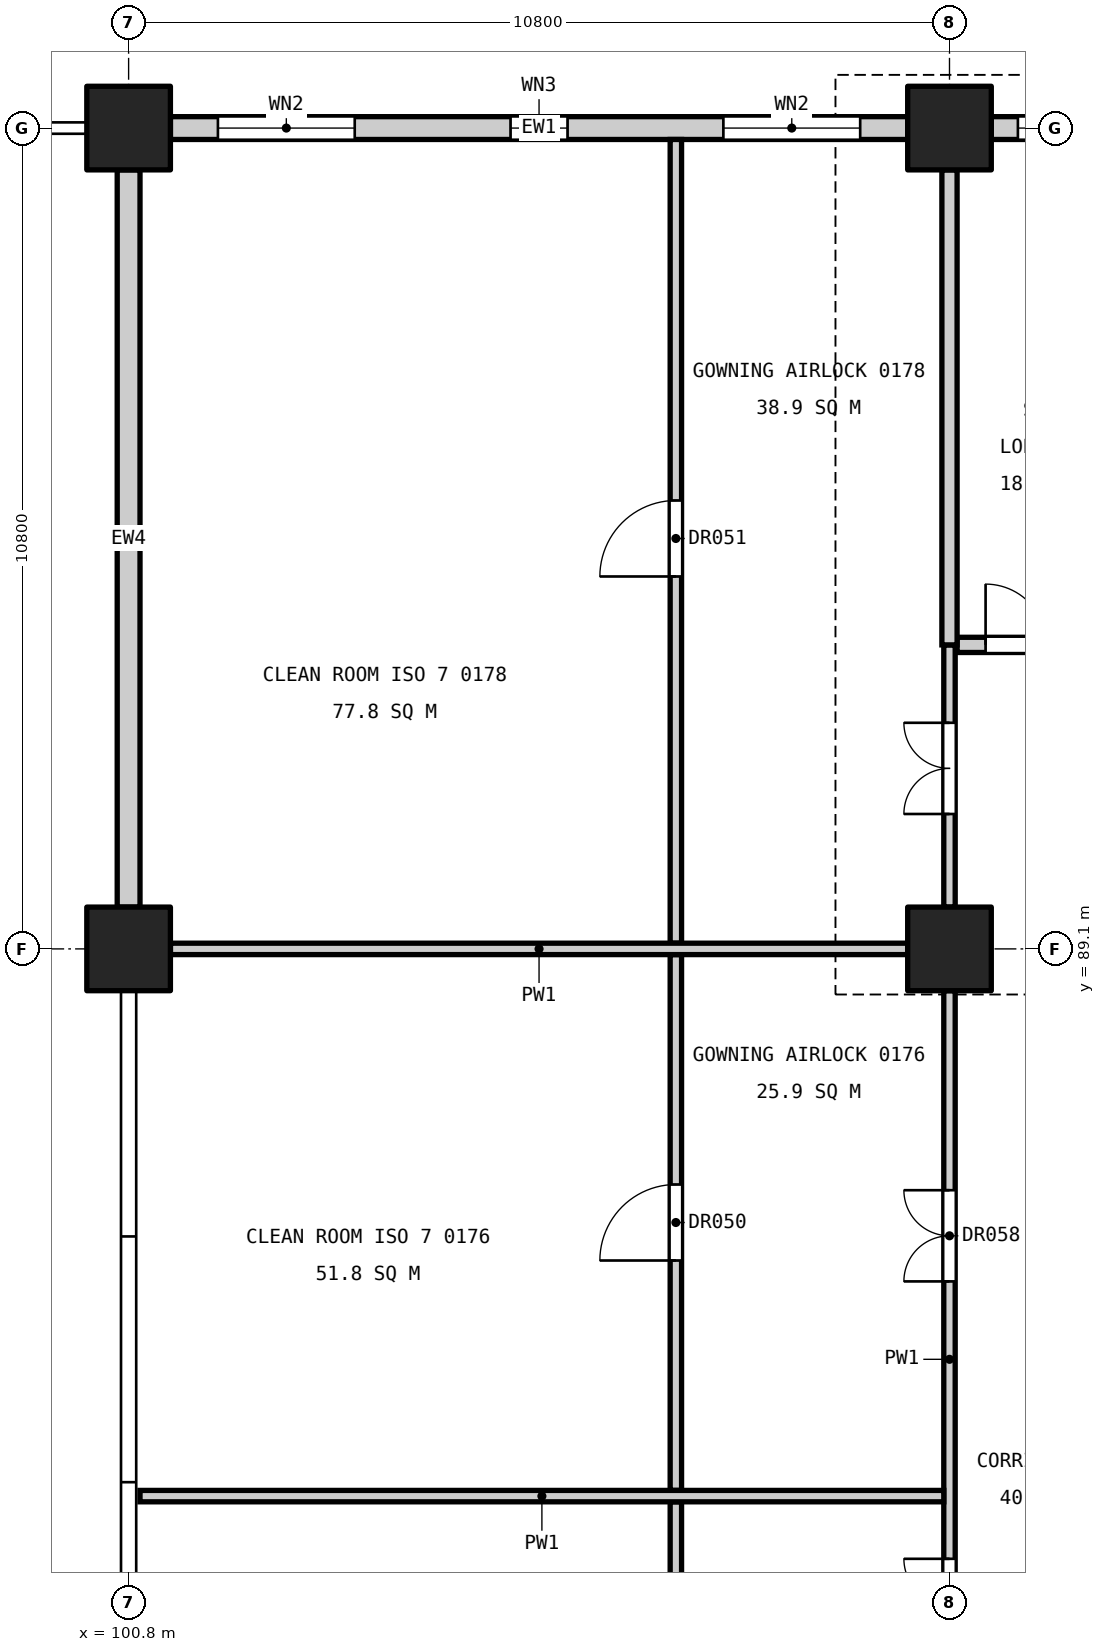
"""IFC4 building model, lengths in metres.
Left out: names, types, materials, properties, quantities, classifications, styles, units other than length and angle.
Written with IfcOpenShell. Run it as: python <this file> out.ifc"""

import sys

from ifc_helpers import new_model, si_unit, direction, frame, frame_2d, origin, origin_2d, place, context, subcontext, project, spatial, rectangle, extrude, element, fill, save


model = new_model("IFC4")
c1 = context("Model", 3, precision=1e-05, world=origin(), true_north=direction((0.0, 1.0)))
c2 = subcontext(c1, "Body", "Model", "MODEL_VIEW")
j1 = project(units=[si_unit("LENGTHUNIT", "METRE"), si_unit("PLANEANGLEUNIT", "RADIAN")], contexts=[c1])
p1 = place(None, origin())
s1 = spatial("IfcSite", under=j1, at=p1, CompositionType="ELEMENT")
p2 = place(p1, origin())
s2 = spatial("IfcBuilding", under=s1, at=p2, CompositionType="ELEMENT")
p3 = place(p2, frame((0.0, 0.0, 6.0)))
s3 = spatial("IfcBuildingStorey", under=s2, at=p3, CompositionType="ELEMENT", Elevation=6.0)
for number, where, z_axis, x_axis in (
    (1, (111.6, 89.1, 0.0), (0.0, 0.0, 1.0), (1.0, 0.0, 0.0)),
    (2, (111.6, 99.9, 0.0), (0.0, 0.0, 1.0), (1.0, 0.0, 0.0)),
    (3, (100.8, 89.1, 0.0), (0.0, 0.0, 1.0), (1.0, 0.0, 0.0)),
    (4, (100.8, 99.9, 0.0), (0.0, 0.0, 1.0), (1.0, 0.0, 0.0)),
):
    element("IfcColumn", number, at=place(p3, frame(where, z_axis=z_axis, x_axis=x_axis)), inside=s3, PredefinedType="COLUMN", context=c2, shape_type="SweptSolid", body=[
        extrude(rectangle(XDim=1.1, YDim=1.1, at=origin_2d()), origin(), (0.0, 0.0, 1.0), 5.4),
    ])
p4 = place(p3, frame((114.05, 99.9, 0.0), z_axis=(0.0, 0.0, 1.0), x_axis=(-1.0, 0.0, 0.0)))
e5 = element("IfcWall", 5, at=p4, inside=s3, PredefinedType="STANDARD", context=c2, shape_type="SweptSolid", body=[
    extrude(rectangle(XDim=1.9, YDim=0.3, at=frame_2d((0.95, 0.0))), origin(), (0.0, 0.0, 1.0), 4.3),
])
p5 = place(p4, frame((0.35, 0.0, 0.9)))
e6 = element("IfcOpeningElement", 6, at=p5, cuts=e5, PredefinedType="OPENING", context=c2, shape_type="SweptSolid", body=[
    extrude(rectangle(XDim=1.2, YDim=2.4, at=frame_2d((0.6, 1.2))), frame((0.0, 0.16, 0.0), z_axis=(0.0, -1.0, 0.0), x_axis=(1.0, 0.0, 0.0)), (0.0, 0.0, 1.0), 0.32),
])
p6 = place(p3, frame((111.05, 99.9, 0.0), z_axis=(0.0, 0.0, 1.0), x_axis=(-1.0, 0.0, 0.0)))
e7 = element("IfcWall", 7, at=p6, inside=s3, PredefinedType="STANDARD", context=c2, shape_type="SweptSolid", body=[
    extrude(rectangle(XDim=9.7, YDim=0.3, at=frame_2d((4.85, 0.0))), origin(), (0.0, 0.0, 1.0), 4.3),
])
p7 = place(p6, frame((0.625, 0.0, 0.9)))
e8 = element("IfcOpeningElement", 8, at=p7, cuts=e7, PredefinedType="OPENING", context=c2, shape_type="SweptSolid", body=[
    extrude(rectangle(XDim=1.8, YDim=3.0, at=frame_2d((0.9, 1.5))), frame((0.0, 0.16, 0.0), z_axis=(0.0, -1.0, 0.0), x_axis=(1.0, 0.0, 0.0)), (0.0, 0.0, 1.0), 0.32),
])
p8 = place(p6, frame((4.475, 0.0, 0.8)))
e9 = element("IfcOpeningElement", 9, at=p8, cuts=e7, PredefinedType="OPENING", context=c2, shape_type="SweptSolid", body=[
    extrude(rectangle(XDim=0.75, YDim=1.2, at=frame_2d((0.375, 0.6))), frame((0.0, 0.16, 0.0), z_axis=(0.0, -1.0, 0.0), x_axis=(1.0, 0.0, 0.0)), (0.0, 0.0, 1.0), 0.32),
])
p9 = place(p6, frame((7.275, 0.0, 0.9)))
e10 = element("IfcOpeningElement", 10, at=p9, cuts=e7, PredefinedType="OPENING", context=c2, shape_type="SweptSolid", body=[
    extrude(rectangle(XDim=1.8, YDim=3.0, at=frame_2d((0.9, 1.5))), frame((0.0, 0.16, 0.0), z_axis=(0.0, -1.0, 0.0), x_axis=(1.0, 0.0, 0.0)), (0.0, 0.0, 1.0), 0.32),
])
p10 = place(p3, frame((100.8, 89.65, 0.0), z_axis=(0.0, 0.0, 1.0), x_axis=(0.0, 1.0, 0.0)))
e11 = element("IfcWall", 11, at=p10, inside=s3, PredefinedType="STANDARD", context=c2, shape_type="SweptSolid", body=[
    extrude(rectangle(XDim=9.7, YDim=0.3, at=frame_2d((4.85, 0.0))), origin(), (0.0, 0.0, 1.0), 4.0),
])
p11 = place(p3, frame((114.05, 93.1, 0.0), z_axis=(0.0, 0.0, 1.0), x_axis=(-1.0, 0.0, 0.0)))
e12 = element("IfcWall", 12, at=p11, inside=s3, PredefinedType="PARTITIONING", context=c2, shape_type="SweptSolid", body=[
    extrude(rectangle(XDim=2.35, YDim=0.2, at=frame_2d((1.175, 0.0))), origin(), (0.0, 0.0, 1.0), 4.0),
])
p12 = place(p11, frame((0.375, 0.0, 0.0)))
e13 = element("IfcOpeningElement", 13, at=p12, cuts=e12, PredefinedType="OPENING", context=c2, shape_type="SweptSolid", body=[
    extrude(rectangle(XDim=1.6, YDim=2.1, at=frame_2d((0.8, 1.05))), frame((0.0, 0.11, 0.0), z_axis=(0.0, -1.0, 0.0), x_axis=(1.0, 0.0, 0.0)), (0.0, 0.0, 1.0), 0.22),
])
p13 = place(p3, frame((111.6, 78.85, 0.0), z_axis=(0.0, 0.0, 1.0), x_axis=(0.0, 1.0, 0.0)))
e14 = element("IfcWall", 14, at=p13, inside=s3, PredefinedType="PARTITIONING", context=c2, shape_type="SweptSolid", body=[
    extrude(rectangle(XDim=9.7, YDim=0.15, at=frame_2d((4.85, 0.0))), origin(), (0.0, 0.0, 1.0), 4.0),
])
p14 = place(p13, frame((1.025, 0.0, 0.0)))
e15 = element("IfcOpeningElement", 15, at=p14, cuts=e14, PredefinedType="OPENING", context=c2, shape_type="SweptSolid", body=[
    extrude(rectangle(XDim=1.2, YDim=2.1, at=frame_2d((0.6, 1.05))), frame((0.0, 0.085, 0.0), z_axis=(0.0, -1.0, 0.0), x_axis=(1.0, 0.0, 0.0)), (0.0, 0.0, 1.0), 0.17),
])
p15 = place(p13, frame((5.875, 0.0, 0.0)))
e16 = element("IfcOpeningElement", 16, at=p15, cuts=e14, PredefinedType="OPENING", context=c2, shape_type="SweptSolid", body=[
    extrude(rectangle(XDim=1.2, YDim=2.1, at=frame_2d((0.6, 1.05))), frame((0.0, 0.085, 0.0), z_axis=(0.0, -1.0, 0.0), x_axis=(1.0, 0.0, 0.0)), (0.0, 0.0, 1.0), 0.17),
])
p16 = place(p3, frame((111.6, 89.65, 0.0), z_axis=(0.0, 0.0, 1.0), x_axis=(0.0, 1.0, 0.0)))
e17 = element("IfcWall", 17, at=p16, inside=s3, PredefinedType="PARTITIONING", context=c2, shape_type="SweptSolid", body=[
    extrude(rectangle(XDim=3.45, YDim=0.15, at=frame_2d((1.725, 0.0))), origin(), (0.0, 0.0, 1.0), 4.0),
])
p17 = place(p16, frame((1.225, 0.0, 0.0)))
e18 = element("IfcOpeningElement", 18, at=p17, cuts=e17, PredefinedType="OPENING", context=c2, shape_type="SweptSolid", body=[
    extrude(rectangle(XDim=1.2, YDim=2.1, at=frame_2d((0.6, 1.05))), frame((0.0, 0.085, 0.0), z_axis=(0.0, -1.0, 0.0), x_axis=(1.0, 0.0, 0.0)), (0.0, 0.0, 1.0), 0.17),
])
p18 = place(p3, frame((111.6, 93.1, 0.0), z_axis=(0.0, 0.0, 1.0), x_axis=(0.0, 1.0, 0.0)))
e19 = element("IfcWall", 19, at=p18, inside=s3, PredefinedType="PARTITIONING", context=c2, shape_type="SweptSolid", body=[
    extrude(rectangle(XDim=6.25, YDim=0.2, at=frame_2d((3.125, 0.0))), origin(), (0.0, 0.0, 1.0), 4.0),
])
p19 = place(p3, frame((108.0, 78.45, 0.0), z_axis=(0.0, 0.0, 1.0), x_axis=(0.0, 1.0, 0.0)))
e20 = element("IfcWall", 20, at=p19, inside=s3, PredefinedType="PARTITIONING", context=c2, shape_type="SweptSolid", body=[
    extrude(rectangle(XDim=3.375, YDim=0.15, at=frame_2d((1.688, 0.0))), origin(), (0.0, 0.0, 1.0), 4.0),
])
p20 = place(p19, frame((1.15, 0.0, 0.0)))
e21 = element("IfcOpeningElement", 21, at=p20, cuts=e20, PredefinedType="OPENING", context=c2, shape_type="SweptSolid", body=[
    extrude(rectangle(XDim=1.0, YDim=2.1, at=frame_2d((0.5, 1.05))), frame((0.0, 0.085, 0.0), z_axis=(0.0, -1.0, 0.0), x_axis=(1.0, 0.0, 0.0)), (0.0, 0.0, 1.0), 0.17),
])
p21 = place(p3, frame((108.0, 81.975, 0.0), z_axis=(0.0, 0.0, 1.0), x_axis=(0.0, 1.0, 0.0)))
e22 = element("IfcWall", 22, at=p21, inside=s3, PredefinedType="PARTITIONING", context=c2, shape_type="SweptSolid", body=[
    extrude(rectangle(XDim=7.05, YDim=0.15, at=frame_2d((3.525, 0.0))), origin(), (0.0, 0.0, 1.0), 4.0),
])
p22 = place(p21, frame((3.025, 0.0, 0.0)))
e23 = element("IfcOpeningElement", 23, at=p22, cuts=e22, PredefinedType="OPENING", context=c2, shape_type="SweptSolid", body=[
    extrude(rectangle(XDim=1.0, YDim=2.1, at=frame_2d((0.5, 1.05))), frame((0.0, 0.085, 0.0), z_axis=(0.0, -1.0, 0.0), x_axis=(1.0, 0.0, 0.0)), (0.0, 0.0, 1.0), 0.17),
])
p23 = place(p3, frame((108.0, 89.175, 0.0), z_axis=(0.0, 0.0, 1.0), x_axis=(0.0, 1.0, 0.0)))
e24 = element("IfcWall", 24, at=p23, inside=s3, PredefinedType="PARTITIONING", context=c2, shape_type="SweptSolid", body=[
    extrude(rectangle(XDim=10.575, YDim=0.15, at=frame_2d((5.288, 0.0))), origin(), (0.0, 0.0, 1.0), 4.0),
])
p24 = place(p23, frame((4.825, 0.0, 0.0)))
e25 = element("IfcOpeningElement", 25, at=p24, cuts=e24, PredefinedType="OPENING", context=c2, shape_type="SweptSolid", body=[
    extrude(rectangle(XDim=1.0, YDim=2.1, at=frame_2d((0.5, 1.05))), frame((0.0, 0.085, 0.0), z_axis=(0.0, -1.0, 0.0), x_axis=(1.0, 0.0, 0.0)), (0.0, 0.0, 1.0), 0.17),
])
p25 = place(p3, frame((111.525, 81.9, 0.0), z_axis=(0.0, 0.0, 1.0), x_axis=(-1.0, 0.0, 0.0)))
e26 = element("IfcWall", 26, at=p25, inside=s3, PredefinedType="PARTITIONING", context=c2, shape_type="SweptSolid", body=[
    extrude(rectangle(XDim=10.575, YDim=0.15, at=frame_2d((5.288, 0.0))), origin(), (0.0, 0.0, 1.0), 4.3),
])
p26 = place(p3, frame((111.05, 89.1, 0.0), z_axis=(0.0, 0.0, 1.0), x_axis=(-1.0, 0.0, 0.0)))
e27 = element("IfcWall", 27, at=p26, inside=s3, PredefinedType="PARTITIONING", context=c2, shape_type="SweptSolid", body=[
    extrude(rectangle(XDim=9.7, YDim=0.15, at=frame_2d((4.85, 0.0))), origin(), (0.0, 0.0, 1.0), 4.3),
])
p27 = place(p5, origin())
e28 = element("IfcWindow", 28, at=p27, inside=s3, PartitioningType="SINGLE_PANEL", PredefinedType="WINDOW", context=c2, shape_type="SweptSolid", body=[
    extrude(rectangle(XDim=1.2, YDim=2.4, at=frame_2d((0.6, 1.2))), frame((0.0, 0.03, 0.0), z_axis=(0.0, -1.0, 0.0), x_axis=(1.0, 0.0, 0.0)), (0.0, 0.0, 1.0), 0.06),
])
fill(e6, e28)
p28 = place(p7, origin())
e29 = element("IfcWindow", 29, at=p28, inside=s3, PartitioningType="SINGLE_PANEL", PredefinedType="WINDOW", context=c2, shape_type="SweptSolid", body=[
    extrude(rectangle(XDim=1.8, YDim=3.0, at=frame_2d((0.9, 1.5))), frame((0.0, 0.03, 0.0), z_axis=(0.0, -1.0, 0.0), x_axis=(1.0, 0.0, 0.0)), (0.0, 0.0, 1.0), 0.06),
])
fill(e8, e29)
p29 = place(p8, origin())
e30 = element("IfcWindow", 30, at=p29, inside=s3, PartitioningType="SINGLE_PANEL", PredefinedType="WINDOW", context=c2, shape_type="SweptSolid", body=[
    extrude(rectangle(XDim=0.75, YDim=1.2, at=frame_2d((0.375, 0.6))), frame((0.0, 0.03, 0.0), z_axis=(0.0, -1.0, 0.0), x_axis=(1.0, 0.0, 0.0)), (0.0, 0.0, 1.0), 0.06),
])
fill(e9, e30)
p30 = place(p9, origin())
e31 = element("IfcWindow", 31, at=p30, inside=s3, PartitioningType="SINGLE_PANEL", PredefinedType="WINDOW", context=c2, shape_type="SweptSolid", body=[
    extrude(rectangle(XDim=1.8, YDim=3.0, at=frame_2d((0.9, 1.5))), frame((0.0, 0.03, 0.0), z_axis=(0.0, -1.0, 0.0), x_axis=(1.0, 0.0, 0.0)), (0.0, 0.0, 1.0), 0.06),
])
fill(e10, e31)
p31 = place(p22, origin())
e32 = element("IfcDoor", 32, at=p31, inside=s3, OperationType="SINGLE_SWING_LEFT", PredefinedType="DOOR", context=c2, shape_type="SweptSolid", body=[
    extrude(rectangle(XDim=1.0, YDim=2.1, at=frame_2d((0.5, 1.05))), frame((0.0, 0.025, 0.0), z_axis=(0.0, -1.0, 0.0), x_axis=(1.0, 0.0, 0.0)), (0.0, 0.0, 1.0), 0.05),
])
fill(e23, e32)
p32 = place(p24, origin())
e33 = element("IfcDoor", 33, at=p32, inside=s3, OperationType="SINGLE_SWING_LEFT", PredefinedType="DOOR", context=c2, shape_type="SweptSolid", body=[
    extrude(rectangle(XDim=1.0, YDim=2.1, at=frame_2d((0.5, 1.05))), frame((0.0, 0.025, 0.0), z_axis=(0.0, -1.0, 0.0), x_axis=(1.0, 0.0, 0.0)), (0.0, 0.0, 1.0), 0.05),
])
fill(e25, e33)
p33 = place(p14, origin())
e34 = element("IfcDoor", 34, at=p33, inside=s3, OperationType="DOUBLE_DOOR_SINGLE_SWING", PredefinedType="DOOR", context=c2, shape_type="SweptSolid", body=[
    extrude(rectangle(XDim=1.2, YDim=2.1, at=frame_2d((0.6, 1.05))), frame((0.0, 0.025, 0.0), z_axis=(0.0, -1.0, 0.0), x_axis=(1.0, 0.0, 0.0)), (0.0, 0.0, 1.0), 0.05),
])
fill(e15, e34)
p34 = place(p15, origin())
e35 = element("IfcDoor", 35, at=p34, inside=s3, OperationType="DOUBLE_DOOR_SINGLE_SWING", PredefinedType="DOOR", context=c2, shape_type="SweptSolid", body=[
    extrude(rectangle(XDim=1.2, YDim=2.1, at=frame_2d((0.6, 1.05))), frame((0.0, 0.025, 0.0), z_axis=(0.0, -1.0, 0.0), x_axis=(1.0, 0.0, 0.0)), (0.0, 0.0, 1.0), 0.05),
])
fill(e16, e35)
p35 = place(p17, origin())
e36 = element("IfcDoor", 36, at=p35, inside=s3, OperationType="DOUBLE_DOOR_SINGLE_SWING", PredefinedType="DOOR", context=c2, shape_type="SweptSolid", body=[
    extrude(rectangle(XDim=1.2, YDim=2.1, at=frame_2d((0.6, 1.05))), frame((0.0, 0.025, 0.0), z_axis=(0.0, -1.0, 0.0), x_axis=(1.0, 0.0, 0.0)), (0.0, 0.0, 1.0), 0.05),
])
fill(e18, e36)
p36 = place(p12, frame((1.6, 0.0, 0.0), z_axis=(0.0, 0.0, 1.0), x_axis=(-1.0, 0.0, 0.0)))
e37 = element("IfcDoor", 37, at=p36, inside=s3, OperationType="DOUBLE_DOOR_SINGLE_SWING", PredefinedType="DOOR", context=c2, shape_type="SweptSolid", body=[
    extrude(rectangle(XDim=1.6, YDim=2.1, at=frame_2d((0.8, 1.05))), frame((0.0, 0.025, 0.0), z_axis=(0.0, -1.0, 0.0), x_axis=(1.0, 0.0, 0.0)), (0.0, 0.0, 1.0), 0.05),
])
fill(e13, e37)
save(model, sys.argv[1])
